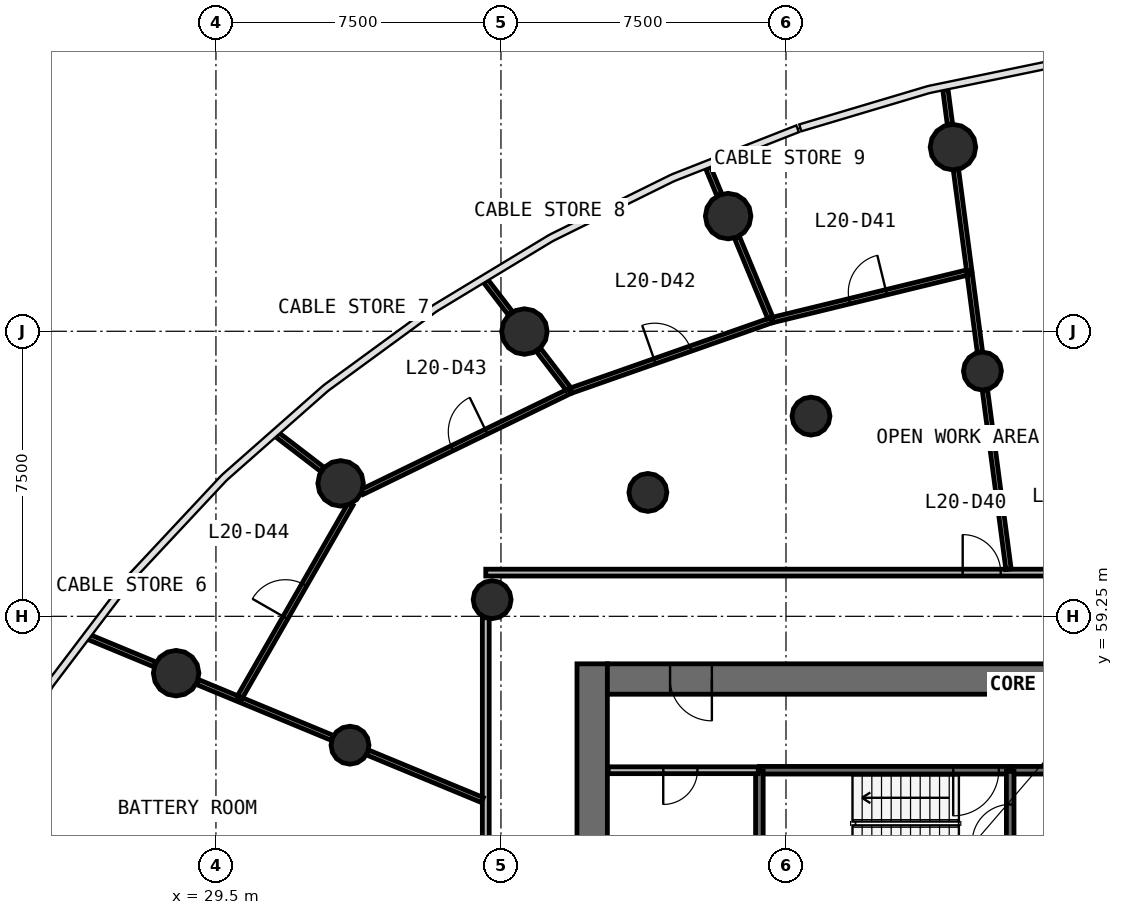
"""IFC4 building model, lengths in metres.
Left out: names, types, materials, properties, quantities, classifications, styles, units other than length and angle.
Written with IfcOpenShell. Run it as: python <this file> out.ifc"""

import sys

from ifc_helpers import new_model, si_unit, direction, frame, frame_2d, origin, origin_2d, place, context, subcontext, project, spatial, rectangle, circle, extrude, source, transform, mapped, element, fill, save


model = new_model("IFC4")
c1 = context("Model", 3, precision=1e-05, world=origin(), true_north=direction((0.0, 1.0)))
c2 = subcontext(c1, "Body", "Model", "MODEL_VIEW")
j1 = project(units=[si_unit("LENGTHUNIT", "METRE"), si_unit("PLANEANGLEUNIT", "RADIAN")], contexts=[c1])
p1 = place(None, origin())
s1 = spatial("IfcSite", under=j1, at=p1, CompositionType="ELEMENT")
p2 = place(p1, origin())
s2 = spatial("IfcBuilding", under=s1, at=p2, CompositionType="ELEMENT")
p3 = place(p2, frame((0.0, 0.0, 88.0)))
s3 = spatial("IfcBuildingStorey", under=s2, at=p3, CompositionType="ELEMENT", Elevation=88.0)
p4 = place(p3, frame((39.4, 58.0, 0.0), z_axis=(0.0, 0.0, 1.0), x_axis=(0.0, -1.0, 0.0)))
e1 = element("IfcWall", 1, at=p4, inside=s3, PredefinedType="SHEAR", context=c2, shape_type="SweptSolid", body=[
    extrude(rectangle(XDim=20.0, YDim=0.8, at=frame_2d((10.0, 0.0))), origin(), (0.0, 0.0, 1.0), 4.1),
])
p5 = place(p4, frame((9.1, 0.0, 0.0)))
e2 = element("IfcOpeningElement", 2, at=p5, cuts=e1, PredefinedType="OPENING", context=c2, shape_type="SweptSolid", body=[
    extrude(rectangle(XDim=1.8, YDim=2.1, at=frame_2d((0.9, 1.05))), frame((0.0, 0.41, 0.0), z_axis=(0.0, -1.0, 0.0), x_axis=(1.0, 0.0, 0.0)), (0.0, 0.0, 1.0), 0.82),
])
p6 = place(p3, frame((64.2, 57.6, 0.0), z_axis=(0.0, 0.0, 1.0), x_axis=(-1.0, 0.0, 0.0)))
e3 = element("IfcWall", 3, at=p6, inside=s3, PredefinedType="SHEAR", context=c2, shape_type="SweptSolid", body=[
    extrude(rectangle(XDim=24.4, YDim=0.8, at=frame_2d((12.2, 0.0))), origin(), (0.0, 0.0, 1.0), 4.1),
])
p7 = place(p6, frame((21.65, 0.0, 0.0)))
e4 = element("IfcOpeningElement", 4, at=p7, cuts=e3, PredefinedType="OPENING", context=c2, shape_type="SweptSolid", body=[
    extrude(rectangle(XDim=1.1, YDim=2.1, at=frame_2d((0.55, 1.05))), frame((0.0, 0.41, 0.0), z_axis=(0.0, -1.0, 0.0), x_axis=(1.0, 0.0, 0.0)), (0.0, 0.0, 1.0), 0.82),
])
p8 = place(p6, frame((2.15, 0.0, 0.0)))
e5 = element("IfcOpeningElement", 5, at=p8, cuts=e3, PredefinedType="OPENING", context=c2, shape_type="SweptSolid", body=[
    extrude(rectangle(XDim=1.1, YDim=2.1, at=frame_2d((0.55, 1.05))), frame((0.0, 0.41, 0.0), z_axis=(0.0, -1.0, 0.0), x_axis=(1.0, 0.0, 0.0)), (0.0, 0.0, 1.0), 0.82),
])
m1 = source(origin(), c2, "Body", "SweptSolid", [
    extrude(circle(Radius=0.6, at=origin_2d()), origin(), (0.0, 0.0, 1.0), 4.1),
])
for number, where, z_axis, x_axis in (
    (6, (48.894, 71.595, 0.0), (0.0, 0.0, 1.0), (1.0, 0.0, 0.0)),
    (7, (42.978, 69.781, 0.0), (0.0, 0.0, 1.0), (1.0, 0.0, 0.0)),
    (8, (37.618, 66.743, 0.0), (0.0, 0.0, 1.0), (1.0, 0.0, 0.0)),
    (9, (32.78, 62.748, 0.0), (0.0, 0.0, 1.0), (1.0, 0.0, 0.0)),
    (10, (28.452, 57.754, 0.0), (0.0, 0.0, 1.0), (1.0, 0.0, 0.0)),
):
    element("IfcColumn", number, at=place(p3, frame(where, z_axis=z_axis, x_axis=x_axis)), inside=s3, PredefinedType="COLUMN", context=c2, shape_type="MappedRepresentation", body=[
        mapped(m1, transform((0.0, 0.0, 0.0), scale=1.0)),
    ])
m2 = source(origin(), c2, "Body", "SweptSolid", [
    extrude(circle(Radius=0.5, at=origin_2d()), origin(), (0.0, 0.0, 1.0), 4.1),
])
for number, where, z_axis, x_axis in (
    (11, (49.669, 65.703, 0.0), (0.0, 0.0, 1.0), (1.0, 0.0, 0.0)),
    (12, (45.158, 64.518, 0.0), (0.0, 0.0, 1.0), (1.0, 0.0, 0.0)),
    (13, (40.866, 62.51, 0.0), (0.0, 0.0, 1.0), (1.0, 0.0, 0.0)),
    (14, (36.768, 59.688, 0.0), (0.0, 0.0, 1.0), (1.0, 0.0, 0.0)),
    (15, (33.028, 55.859, 0.0), (0.0, 0.0, 1.0), (1.0, 0.0, 0.0)),
):
    element("IfcColumn", number, at=place(p3, frame(where, z_axis=z_axis, x_axis=x_axis)), inside=s3, PredefinedType="COLUMN", context=c2, shape_type="MappedRepresentation", body=[
        mapped(m2, transform((0.0, 0.0, 0.0), scale=1.0)),
    ])
p9 = place(p3, frame((50.4, 55.2, 0.0), z_axis=(0.0, 0.0, 1.0), x_axis=(-1.0, 0.0, 0.0)))
e16 = element("IfcWall", 16, at=p9, inside=s3, PredefinedType="SOLIDWALL", context=c2, shape_type="SweptSolid", body=[
    extrude(rectangle(XDim=6.6, YDim=0.2, at=frame_2d((3.3, 0.0))), origin(), (0.0, 0.0, 1.0), 3.7),
])
p10 = place(p9, frame((0.3, 0.0, 0.0)))
e17 = element("IfcOpeningElement", 17, at=p10, cuts=e16, PredefinedType="OPENING", context=c2, shape_type="SweptSolid", body=[
    extrude(rectangle(XDim=1.2, YDim=2.1, at=frame_2d((0.6, 1.05))), frame((0.0, 0.11, 0.0), z_axis=(0.0, -1.0, 0.0), x_axis=(1.0, 0.0, 0.0)), (0.0, 0.0, 1.0), 0.22),
])
p11 = place(p3, frame((56.1, 55.2, 0.0), z_axis=(0.0, 0.0, 1.0), x_axis=(-1.0, 0.0, 0.0)))
e18 = element("IfcWall", 18, at=p11, inside=s3, PredefinedType="SOLIDWALL", context=c2, shape_type="SweptSolid", body=[
    extrude(rectangle(XDim=5.67, YDim=0.2, at=frame_2d((2.835, 0.0))), origin(), (0.0, 0.0, 1.0), 3.7),
])
p12 = place(p11, frame((2.95, 0.0, 0.0)))
e19 = element("IfcOpeningElement", 19, at=p12, cuts=e18, PredefinedType="OPENING", context=c2, shape_type="SweptSolid", body=[
    extrude(rectangle(XDim=1.1, YDim=2.1, at=frame_2d((0.55, 1.05))), frame((0.0, 0.11, 0.0), z_axis=(0.0, -1.0, 0.0), x_axis=(1.0, 0.0, 0.0)), (0.0, 0.0, 1.0), 0.22),
])
p13 = place(p3, frame((50.4, 52.4, 0.0), z_axis=(0.0, 0.0, 1.0), x_axis=(0.0, 1.0, 0.0)))
e20 = element("IfcWall", 20, at=p13, inside=s3, PredefinedType="SOLIDWALL", context=c2, shape_type="SweptSolid", body=[
    extrude(rectangle(XDim=2.77, YDim=0.2, at=frame_2d((1.385, 0.0))), origin(), (0.0, 0.0, 1.0), 3.7),
])
p14 = place(p13, frame((0.9, 0.0, 0.0)))
e21 = element("IfcOpeningElement", 21, at=p14, cuts=e20, PredefinedType="OPENING", context=c2, shape_type="SweptSolid", body=[
    extrude(rectangle(XDim=1.0, YDim=2.1, at=frame_2d((0.5, 1.05))), frame((0.0, 0.11, 0.0), z_axis=(0.0, -1.0, 0.0), x_axis=(1.0, 0.0, 0.0)), (0.0, 0.0, 1.0), 0.22),
])
p15 = place(p3, frame((43.8, 55.17, 0.0), z_axis=(0.0, 0.0, 1.0), x_axis=(0.0, -1.0, 0.0)))
e22 = element("IfcWall", 22, at=p15, inside=s3, PredefinedType="SOLIDWALL", context=c2, shape_type="SweptSolid", body=[
    extrude(rectangle(XDim=2.14, YDim=0.2, at=frame_2d((1.07, 0.0))), origin(), (0.0, 0.0, 1.0), 3.7),
])
p16 = place(p3, frame((36.6, 60.4, 0.0), z_axis=(0.0, 0.0, 1.0), x_axis=(1.0, 0.0, 0.0)))
e23 = element("IfcWall", 23, at=p16, inside=s3, PredefinedType="PARTITIONING", context=c2, shape_type="SweptSolid", body=[
    extrude(rectangle(XDim=30.8, YDim=0.18, at=frame_2d((15.4, 0.0))), origin(), (0.0, 0.0, 1.0), 2.9),
])
p17 = place(p16, frame((20.95, 0.0, 0.0)))
e24 = element("IfcOpeningElement", 24, at=p17, cuts=e23, PredefinedType="OPENING", context=c2, shape_type="SweptSolid", body=[
    extrude(rectangle(XDim=1.0, YDim=2.1, at=frame_2d((0.5, 1.05))), frame((0.0, 0.1, 0.0), z_axis=(0.0, -1.0, 0.0), x_axis=(1.0, 0.0, 0.0)), (0.0, 0.0, 1.0), 0.2),
])
p18 = place(p16, frame((14.95, 0.0, 0.0)))
e25 = element("IfcOpeningElement", 25, at=p18, cuts=e23, PredefinedType="OPENING", context=c2, shape_type="SweptSolid", body=[
    extrude(rectangle(XDim=1.0, YDim=2.1, at=frame_2d((0.5, 1.05))), frame((0.0, 0.1, 0.0), z_axis=(0.0, -1.0, 0.0), x_axis=(1.0, 0.0, 0.0)), (0.0, 0.0, 1.0), 0.2),
])
p19 = place(p16, frame((12.55, 0.0, 0.0)))
e26 = element("IfcOpeningElement", 26, at=p19, cuts=e23, PredefinedType="OPENING", context=c2, shape_type="SweptSolid", body=[
    extrude(rectangle(XDim=1.0, YDim=2.1, at=frame_2d((0.5, 1.05))), frame((0.0, 0.1, 0.0), z_axis=(0.0, -1.0, 0.0), x_axis=(1.0, 0.0, 0.0)), (0.0, 0.0, 1.0), 0.2),
])
p20 = place(p3, frame((36.6, 35.63, 0.0), z_axis=(0.0, 0.0, 1.0), x_axis=(0.0, 1.0, 0.0)))
e27 = element("IfcWall", 27, at=p20, inside=s3, PredefinedType="PARTITIONING", context=c2, shape_type="SweptSolid", body=[
    extrude(rectangle(XDim=23.583, YDim=0.18, at=frame_2d((11.791, 0.0))), origin(), (0.0, 0.0, 1.0), 2.9),
])
p21 = place(p20, frame((14.732, 0.0, 0.0)))
e28 = element("IfcOpeningElement", 28, at=p21, cuts=e27, PredefinedType="OPENING", context=c2, shape_type="SweptSolid", body=[
    extrude(rectangle(XDim=1.0, YDim=2.1, at=frame_2d((0.5, 1.05))), frame((0.0, 0.1, 0.0), z_axis=(0.0, -1.0, 0.0), x_axis=(1.0, 0.0, 0.0)), (0.0, 0.0, 1.0), 0.2),
])
p22 = place(p20, frame((11.333, 0.0, 0.0)))
e29 = element("IfcOpeningElement", 29, at=p22, cuts=e27, PredefinedType="OPENING", context=c2, shape_type="SweptSolid", body=[
    extrude(rectangle(XDim=1.0, YDim=2.1, at=frame_2d((0.5, 1.05))), frame((0.0, 0.1, 0.0), z_axis=(0.0, -1.0, 0.0), x_axis=(1.0, 0.0, 0.0)), (0.0, 0.0, 1.0), 0.2),
])
p23 = place(p3, frame((43.77, 55.2, 0.0), z_axis=(0.0, 0.0, 1.0), x_axis=(-1.0, 0.0, 0.0)))
e30 = element("IfcWall", 30, at=p23, inside=s3, PredefinedType="PARTITIONING", context=c2, shape_type="SweptSolid", body=[
    extrude(rectangle(XDim=3.95, YDim=0.18, at=frame_2d((1.975, 0.0))), origin(), (0.0, 0.0, 1.0), 3.7),
])
p24 = place(p23, frame((1.6, 0.0, 0.0)))
e31 = element("IfcOpeningElement", 31, at=p24, cuts=e30, PredefinedType="OPENING", context=c2, shape_type="SweptSolid", body=[
    extrude(rectangle(XDim=0.9, YDim=2.1, at=frame_2d((0.45, 1.05))), frame((0.0, 0.1, 0.0), z_axis=(0.0, -1.0, 0.0), x_axis=(1.0, 0.0, 0.0)), (0.0, 0.0, 1.0), 0.2),
])
p25 = place(p3, frame((33.34, 62.518, 0.0), z_axis=(0.0, 0.0, 1.0), x_axis=(0.899444681521, 0.437034626641, 0.0)))
e32 = element("IfcWall", 32, at=p25, inside=s3, PredefinedType="PARTITIONING", context=c2, shape_type="SweptSolid", body=[
    extrude(rectangle(XDim=6.09, YDim=0.14, at=frame_2d((3.045, 0.0))), origin(), (0.0, 0.0, 1.0), 2.9),
])
p26 = place(p25, frame((2.64, 0.0, 0.0)))
e33 = element("IfcOpeningElement", 33, at=p26, cuts=e32, PredefinedType="OPENING", context=c2, shape_type="SweptSolid", body=[
    extrude(rectangle(XDim=1.0, YDim=2.1, at=frame_2d((0.5, 1.05))), frame((0.0, 0.08, 0.0), z_axis=(0.0, -1.0, 0.0), x_axis=(1.0, 0.0, 0.0)), (0.0, 0.0, 1.0), 0.16),
])
p27 = place(p3, frame((30.098, 57.072, 0.0), z_axis=(0.0, 0.0, 1.0), x_axis=(0.497985873377, 0.867185141661, 0.0)))
e34 = element("IfcWall", 34, at=p27, inside=s3, PredefinedType="PARTITIONING", context=c2, shape_type="SweptSolid", body=[
    extrude(rectangle(XDim=5.918, YDim=0.14, at=frame_2d((2.959, 0.0))), origin(), (0.0, 0.0, 1.0), 2.9),
])
p28 = place(p27, frame((2.469, 0.0, 0.0)))
e35 = element("IfcOpeningElement", 35, at=p28, cuts=e34, PredefinedType="OPENING", context=c2, shape_type="SweptSolid", body=[
    extrude(rectangle(XDim=1.0, YDim=2.1, at=frame_2d((0.5, 1.05))), frame((0.0, 0.08, 0.0), z_axis=(0.0, -1.0, 0.0), x_axis=(1.0, 0.0, 0.0)), (0.0, 0.0, 1.0), 0.16),
])
p29 = place(p3, frame((38.846, 65.19, 0.0), z_axis=(0.0, 0.0, 1.0), x_axis=(0.943529976269, 0.331287162266, 0.0)))
e36 = element("IfcWall", 36, at=p29, inside=s3, PredefinedType="PARTITIONING", context=c2, shape_type="SweptSolid", body=[
    extrude(rectangle(XDim=5.583, YDim=0.14, at=frame_2d((2.792, 0.0))), origin(), (0.0, 0.0, 1.0), 2.9),
])
p30 = place(p29, frame((2.333, 0.0, 0.0)))
e37 = element("IfcOpeningElement", 37, at=p30, cuts=e36, PredefinedType="OPENING", context=c2, shape_type="SweptSolid", body=[
    extrude(rectangle(XDim=1.0, YDim=2.1, at=frame_2d((0.5, 1.05))), frame((0.0, 0.08, 0.0), z_axis=(0.0, -1.0, 0.0), x_axis=(1.0, 0.0, 0.0)), (0.0, 0.0, 1.0), 0.16),
])
p31 = place(p3, frame((44.143, 67.046, 0.0), z_axis=(0.0, 0.0, 1.0), x_axis=(0.971565543157, 0.236770765404, 0.0)))
e38 = element("IfcWall", 38, at=p31, inside=s3, PredefinedType="PARTITIONING", context=c2, shape_type="SweptSolid", body=[
    extrude(rectangle(XDim=5.335, YDim=0.14, at=frame_2d((2.667, 0.0))), origin(), (0.0, 0.0, 1.0), 2.9),
])
p32 = place(p31, frame((2.085, 0.0, 0.0)))
e39 = element("IfcOpeningElement", 39, at=p32, cuts=e38, PredefinedType="OPENING", context=c2, shape_type="SweptSolid", body=[
    extrude(rectangle(XDim=1.0, YDim=2.1, at=frame_2d((0.5, 1.05))), frame((0.0, 0.08, 0.0), z_axis=(0.0, -1.0, 0.0), x_axis=(1.0, 0.0, 0.0)), (0.0, 0.0, 1.0), 0.16),
])
p33 = place(p3, frame((50.356, 60.49, 0.0), z_axis=(0.0, 0.0, 1.0), x_axis=(-0.130548834981, 0.991441880135, 0.0)))
e40 = element("IfcWall", 40, at=p33, inside=s3, PredefinedType="PARTITIONING", context=c2, shape_type="SweptSolid", body=[
    extrude(rectangle(XDim=4.754, YDim=0.14, at=frame_2d((2.377, 0.0))), origin(), (0.0, 0.0, 1.0), 2.9),
])
p34 = place(p3, frame((36.51, 54.416, 0.0), z_axis=(0.0, 0.0, 1.0), x_axis=(-0.923911109142, 0.382607190737, 0.0)))
e41 = element("IfcWall", 41, at=p34, inside=s3, PredefinedType="PARTITIONING", context=c2, shape_type="SweptSolid", body=[
    extrude(rectangle(XDim=3.264, YDim=0.14, at=frame_2d((1.632, 0.0))), origin(), (0.0, 0.0, 1.0), 2.9),
])
p35 = place(p3, frame((49.322, 68.339, 0.0), z_axis=(0.0, 0.0, 1.0), x_axis=(-0.130558210358, 0.99144064558, 0.0)))
e42 = element("IfcWall", 42, at=p35, inside=s3, PredefinedType="PARTITIONING", context=c2, shape_type="SweptSolid", body=[
    extrude(rectangle(XDim=2.68, YDim=0.14, at=frame_2d((1.34, 0.0))), origin(), (0.0, 0.0, 1.0), 2.9),
])
p36 = place(p3, frame((32.561, 56.052, 0.0), z_axis=(0.0, 0.0, 1.0), x_axis=(-0.923893021101, 0.382650866406, 0.0)))
e43 = element("IfcWall", 43, at=p36, inside=s3, PredefinedType="PARTITIONING", context=c2, shape_type="SweptSolid", body=[
    extrude(rectangle(XDim=2.595, YDim=0.14, at=frame_2d((1.298, 0.0))), origin(), (0.0, 0.0, 1.0), 2.9),
])
p37 = place(p3, frame((44.087, 67.104, 0.0), z_axis=(0.0, 0.0, 1.0), x_axis=(-0.382693574563, 0.92387533141, 0.0)))
e44 = element("IfcWall", 44, at=p37, inside=s3, PredefinedType="PARTITIONING", context=c2, shape_type="SweptSolid", body=[
    extrude(rectangle(XDim=2.292, YDim=0.14, at=frame_2d((1.146, 0.0))), origin(), (0.0, 0.0, 1.0), 2.9),
])
p38 = place(p3, frame((49.604, 66.203, 0.0), z_axis=(0.0, 0.0, 1.0), x_axis=(-0.130512933025, 0.99144660689, 0.0)))
e45 = element("IfcWall", 45, at=p38, inside=s3, PredefinedType="PARTITIONING", context=c2, shape_type="SweptSolid", body=[
    extrude(rectangle(XDim=2.054, YDim=0.14, at=frame_2d((1.027, 0.0))), origin(), (0.0, 0.0, 1.0), 2.9),
])
p39 = place(p3, frame((27.893, 57.985, 0.0), z_axis=(0.0, 0.0, 1.0), x_axis=(-0.923896609049, 0.382642203354, 0.0)))
e46 = element("IfcWall", 46, at=p39, inside=s3, PredefinedType="PARTITIONING", context=c2, shape_type="SweptSolid", body=[
    extrude(rectangle(XDim=1.881, YDim=0.14, at=frame_2d((0.94, 0.0))), origin(), (0.0, 0.0, 1.0), 2.9),
])
p40 = place(p3, frame((32.301, 63.116, 0.0), z_axis=(0.0, 0.0, 1.0), x_axis=(-0.793329378559, 0.608792655273, 0.0)))
e47 = element("IfcWall", 47, at=p40, inside=s3, PredefinedType="PARTITIONING", context=c2, shape_type="SweptSolid", body=[
    extrude(rectangle(XDim=1.504, YDim=0.14, at=frame_2d((0.752, 0.0))), origin(), (0.0, 0.0, 1.0), 2.9),
])
p41 = place(p3, frame((38.774, 65.236, 0.0), z_axis=(0.0, 0.0, 1.0), x_axis=(-0.608862940035, 0.793275437822, 0.0)))
e48 = element("IfcWall", 48, at=p41, inside=s3, PredefinedType="PARTITIONING", context=c2, shape_type="SweptSolid", body=[
    extrude(rectangle(XDim=1.295, YDim=0.14, at=frame_2d((0.647, 0.0))), origin(), (0.0, 0.0, 1.0), 2.9),
])
p42 = place(p3, frame((30.07, 57.084, 0.0), z_axis=(0.0, 0.0, 1.0), x_axis=(-0.92391298658, 0.382602657113, 0.0)))
e49 = element("IfcWall", 49, at=p42, inside=s3, PredefinedType="PARTITIONING", context=c2, shape_type="SweptSolid", body=[
    extrude(rectangle(XDim=1.146, YDim=0.14, at=frame_2d((0.573, 0.0))), origin(), (0.0, 0.0, 1.0), 2.9),
])
p43 = place(p3, frame((37.25, 67.222, 0.0), z_axis=(0.0, 0.0, 1.0), x_axis=(-0.608735888805, 0.793372937326, 0.0)))
e50 = element("IfcWall", 50, at=p43, inside=s3, PredefinedType="PARTITIONING", context=c2, shape_type="SweptSolid", body=[
    extrude(rectangle(XDim=1.078, YDim=0.14, at=frame_2d((0.539, 0.0))), origin(), (0.0, 0.0, 1.0), 2.9),
])
p44 = place(p3, frame((48.815, 72.195, 0.0), z_axis=(0.0, 0.0, 1.0), x_axis=(-0.130578341009, 0.99143799446, 0.0)))
e51 = element("IfcWall", 51, at=p44, inside=s3, PredefinedType="PARTITIONING", context=c2, shape_type="SweptSolid", body=[
    extrude(rectangle(XDim=0.918, YDim=0.14, at=frame_2d((0.459, 0.0))), origin(), (0.0, 0.0, 1.0), 2.9),
])
p45 = place(p3, frame((42.747, 70.34, 0.0), z_axis=(0.0, 0.0, 1.0), x_axis=(-0.382846589746, 0.923811933631, 0.0)))
e52 = element("IfcWall", 52, at=p45, inside=s3, PredefinedType="PARTITIONING", context=c2, shape_type="SweptSolid", body=[
    extrude(rectangle(XDim=0.784, YDim=0.14, at=frame_2d((0.392, 0.0))), origin(), (0.0, 0.0, 1.0), 2.9),
])
m3 = source(origin(), c2, "Body", "SweptSolid", [
    extrude(rectangle(XDim=1.2, YDim=2.1, at=frame_2d((0.6, 1.05))), frame((0.0, 0.025, 0.0), z_axis=(0.0, -1.0, 0.0), x_axis=(1.0, 0.0, 0.0)), (0.0, 0.0, 1.0), 0.05),
])
p46 = place(p10, origin())
e53 = element("IfcDoor", 53, at=p46, inside=s3, OperationType="SINGLE_SWING_RIGHT", PredefinedType="DOOR", context=c2, shape_type="MappedRepresentation", body=[
    mapped(m3, transform((0.0, 0.0, 0.0), scale=1.0)),
])
fill(e17, e53)
m4 = source(origin(), c2, "Body", "SweptSolid", [
    extrude(rectangle(XDim=1.0, YDim=2.1, at=frame_2d((0.5, 1.05))), frame((0.0, 0.025, 0.0), z_axis=(0.0, -1.0, 0.0), x_axis=(1.0, 0.0, 0.0)), (0.0, 0.0, 1.0), 0.05),
])
p47 = place(p14, origin())
e54 = element("IfcDoor", 54, at=p47, inside=s3, OperationType="SINGLE_SWING_LEFT", PredefinedType="DOOR", context=c2, shape_type="MappedRepresentation", body=[
    mapped(m4, transform((0.0, 0.0, 0.0), scale=1.0)),
])
fill(e21, e54)
m5 = source(origin(), c2, "Body", "SweptSolid", [
    extrude(rectangle(XDim=1.1, YDim=2.1, at=frame_2d((0.55, 1.05))), frame((0.0, 0.025, 0.0), z_axis=(0.0, -1.0, 0.0), x_axis=(1.0, 0.0, 0.0)), (0.0, 0.0, 1.0), 0.05),
])
p48 = place(p7, origin())
e55 = element("IfcDoor", 55, at=p48, inside=s3, OperationType="SINGLE_SWING_LEFT", PredefinedType="DOOR", context=c2, shape_type="MappedRepresentation", body=[
    mapped(m5, transform((0.0, 0.0, 0.0), scale=1.0)),
])
fill(e4, e55)
m6 = source(origin(), c2, "Body", "SweptSolid", [
    extrude(rectangle(XDim=1.0, YDim=2.1, at=frame_2d((0.5, 1.05))), frame((0.0, 0.025, 0.0), z_axis=(0.0, -1.0, 0.0), x_axis=(1.0, 0.0, 0.0)), (0.0, 0.0, 1.0), 0.05),
])
p49 = place(p19, origin())
e56 = element("IfcDoor", 56, at=p49, inside=s3, OperationType="SINGLE_SWING_LEFT", PredefinedType="DOOR", context=c2, shape_type="MappedRepresentation", body=[
    mapped(m6, transform((0.0, 0.0, 0.0), scale=1.0)),
])
fill(e26, e56)
p50 = place(p32, origin())
e57 = element("IfcDoor", 57, at=p50, inside=s3, OperationType="SINGLE_SWING_RIGHT", PredefinedType="DOOR", context=c2, shape_type="MappedRepresentation", body=[
    mapped(m6, transform((0.0, 0.0, 0.0), scale=1.0)),
])
fill(e39, e57)
p51 = place(p30, origin())
e58 = element("IfcDoor", 58, at=p51, inside=s3, OperationType="SINGLE_SWING_LEFT", PredefinedType="DOOR", context=c2, shape_type="MappedRepresentation", body=[
    mapped(m6, transform((0.0, 0.0, 0.0), scale=1.0)),
])
fill(e37, e58)
p52 = place(p26, origin())
e59 = element("IfcDoor", 59, at=p52, inside=s3, OperationType="SINGLE_SWING_RIGHT", PredefinedType="DOOR", context=c2, shape_type="MappedRepresentation", body=[
    mapped(m6, transform((0.0, 0.0, 0.0), scale=1.0)),
])
fill(e33, e59)
p53 = place(p28, origin())
e60 = element("IfcDoor", 60, at=p53, inside=s3, OperationType="SINGLE_SWING_LEFT", PredefinedType="DOOR", context=c2, shape_type="MappedRepresentation", body=[
    mapped(m6, transform((0.0, 0.0, 0.0), scale=1.0)),
])
fill(e35, e60)
m7 = source(origin(), c2, "Body", "SweptSolid", [
    extrude(rectangle(XDim=0.9, YDim=2.1, at=frame_2d((0.45, 1.05))), frame((0.0, 0.025, 0.0), z_axis=(0.0, -1.0, 0.0), x_axis=(1.0, 0.0, 0.0)), (0.0, 0.0, 1.0), 0.05),
])
p54 = place(p24, origin())
e61 = element("IfcDoor", 61, at=p54, inside=s3, OperationType="SINGLE_SWING_RIGHT", PredefinedType="DOOR", context=c2, shape_type="MappedRepresentation", body=[
    mapped(m7, transform((0.0, 0.0, 0.0), scale=1.0)),
])
fill(e31, e61)
save(model, sys.argv[1])
